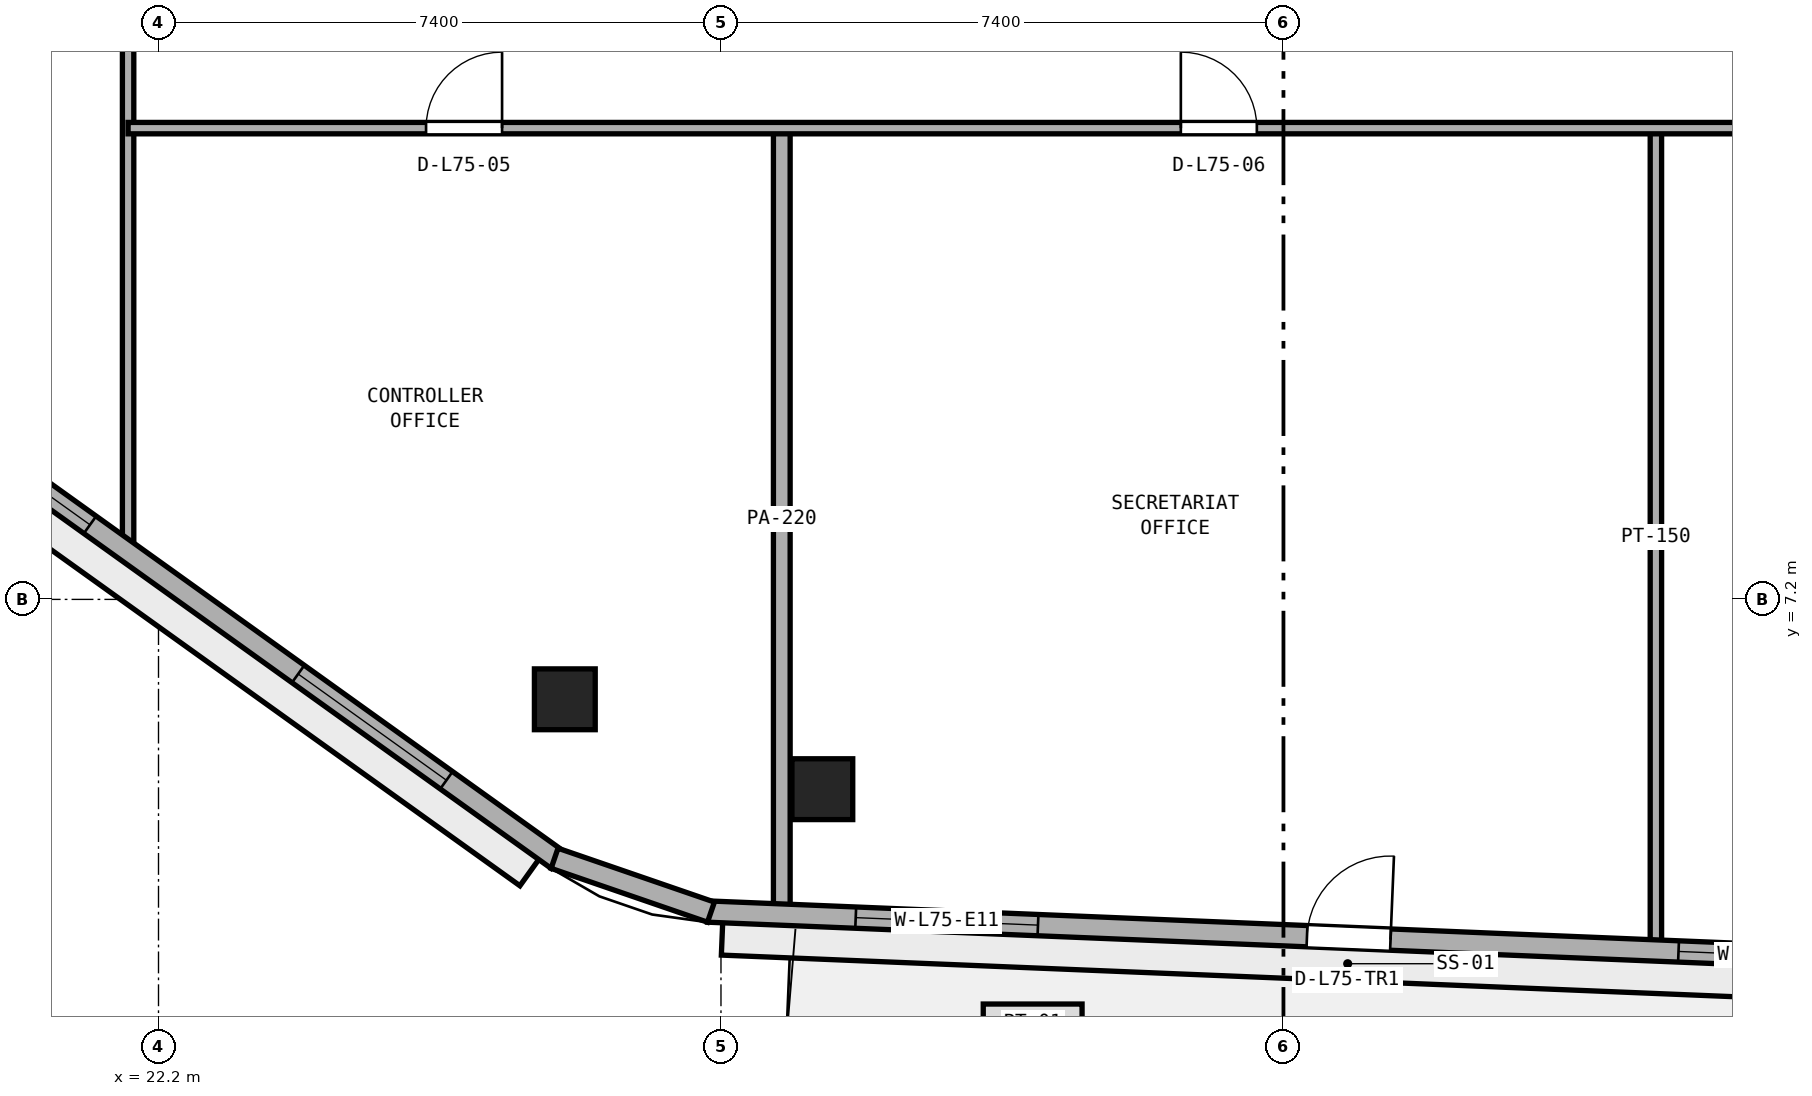
"""IFC4 building model, lengths in metres.
Left out: names, types, materials, properties, quantities, classifications, styles, units other than length and angle.
Written with IfcOpenShell. Run it as: python <this file> out.ifc"""

import sys

from ifc_helpers import new_model, si_unit, direction, frame, frame_2d, origin, origin_2d, place, context, subcontext, project, spatial, rectangle, extrude, element, fill, save


model = new_model("IFC4")
c1 = context("Model", 3, precision=1e-05, world=origin(), true_north=direction((0.0, 1.0)))
c2 = subcontext(c1, "Body", "Model", "MODEL_VIEW")
j1 = project(units=[si_unit("LENGTHUNIT", "METRE"), si_unit("PLANEANGLEUNIT", "RADIAN")], contexts=[c1])
p1 = place(None, origin())
s1 = spatial("IfcSite", under=j1, at=p1, CompositionType="ELEMENT")
p2 = place(p1, origin())
s2 = spatial("IfcBuilding", under=s1, at=p2, CompositionType="ELEMENT")
p3 = place(p2, frame((0.0, 0.0, 293.4)))
s3 = spatial("IfcBuildingStorey", under=s2, at=p3, CompositionType="ELEMENT", Elevation=293.4)
for number, where, z_axis, x_axis in (
    (1, (30.934, 4.703, 0.0), (0.0, 0.0, 1.0), (1.0, 0.0, 0.0)),
    (2, (27.545, 5.886, 0.0), (0.0, 0.0, 1.0), (1.0, 0.0, 0.0)),
):
    element("IfcColumn", number, at=place(p3, frame(where, z_axis=z_axis, x_axis=x_axis)), inside=s3, PredefinedType="COLUMN", context=c2, shape_type="SweptSolid", body=[
        extrude(rectangle(XDim=0.8, YDim=0.8, at=origin_2d()), origin(), (0.0, 0.0, 1.0), 3.8),
    ])
p4 = place(p3, frame((41.9, 2.646, 0.0), z_axis=(0.0, 0.0, 1.0), x_axis=(0.0, 1.0, 0.0)))
e3 = element("IfcWall", 3, at=p4, inside=s3, PredefinedType="PARTITIONING", context=c2, shape_type="SweptSolid", body=[
    extrude(rectangle(XDim=10.754, YDim=0.15, at=frame_2d((5.377, 0.0))), origin(), (0.0, 0.0, 1.0), 3.54),
])
p5 = place(p3, frame((30.4, 3.118, 0.0), z_axis=(0.0, 0.0, 1.0), x_axis=(0.0, 1.0, 0.0)))
e4 = element("IfcWall", 4, at=p5, inside=s3, PredefinedType="PARTITIONING", context=c2, shape_type="SweptSolid", body=[
    extrude(rectangle(XDim=10.282, YDim=0.22, at=frame_2d((5.141, 0.0))), origin(), (0.0, 0.0, 1.0), 3.54),
])
p6 = place(p3, frame((21.8, 7.79, 0.0), z_axis=(0.0, 0.0, 1.0), x_axis=(0.0, 1.0, 0.0)))
e5 = element("IfcWall", 5, at=p6, inside=s3, PredefinedType="PARTITIONING", context=c2, shape_type="SweptSolid", body=[
    extrude(rectangle(XDim=29.21, YDim=0.15, at=frame_2d((14.605, 0.0))), origin(), (0.0, 0.0, 1.0), 3.54),
])
p7 = place(p6, frame((9.76, 0.0, 0.0)))
e6 = element("IfcOpeningElement", 6, at=p7, cuts=e5, PredefinedType="OPENING", context=c2, shape_type="SweptSolid", body=[
    extrude(rectangle(XDim=0.9, YDim=2.1, at=frame_2d((0.45, 1.05))), frame((0.0, 0.085, 0.0), z_axis=(0.0, -1.0, 0.0), x_axis=(1.0, 0.0, 0.0)), (0.0, 0.0, 1.0), 0.17),
])
p8 = place(p6, frame((18.11, 0.0, 0.0)))
e7 = element("IfcOpeningElement", 7, at=p8, cuts=e5, PredefinedType="OPENING", context=c2, shape_type="SweptSolid", body=[
    extrude(rectangle(XDim=0.9, YDim=2.1, at=frame_2d((0.45, 1.05))), frame((0.0, 0.085, 0.0), z_axis=(0.0, -1.0, 0.0), x_axis=(1.0, 0.0, 0.0)), (0.0, 0.0, 1.0), 0.17),
])
p9 = place(p6, frame((23.485, 0.0, 0.0)))
e8 = element("IfcOpeningElement", 8, at=p9, cuts=e5, PredefinedType="OPENING", context=c2, shape_type="SweptSolid", body=[
    extrude(rectangle(XDim=0.9, YDim=2.1, at=frame_2d((0.45, 1.05))), frame((0.0, 0.085, 0.0), z_axis=(0.0, -1.0, 0.0), x_axis=(1.0, 0.0, 0.0)), (0.0, 0.0, 1.0), 0.17),
])
p10 = place(p3, frame((21.8, 13.4, 0.0), z_axis=(0.0, 0.0, 1.0), x_axis=(1.0, 0.0, 0.0)))
e9 = element("IfcWall", 9, at=p10, inside=s3, PredefinedType="PARTITIONING", context=c2, shape_type="SweptSolid", body=[
    extrude(rectangle(XDim=26.8, YDim=0.15, at=frame_2d((13.4, 0.0))), origin(), (0.0, 0.0, 1.0), 3.54),
])
p11 = place(p10, frame((3.92, 0.0, 0.0)))
e10 = element("IfcOpeningElement", 10, at=p11, cuts=e9, PredefinedType="OPENING", context=c2, shape_type="SweptSolid", body=[
    extrude(rectangle(XDim=1.0, YDim=2.12, at=frame_2d((0.5, 1.06))), frame((0.0, 0.085, 0.0), z_axis=(0.0, -1.0, 0.0), x_axis=(1.0, 0.0, 0.0)), (0.0, 0.0, 1.0), 0.17),
])
p12 = place(p10, frame((13.85, 0.0, 0.0)))
e11 = element("IfcOpeningElement", 11, at=p12, cuts=e9, PredefinedType="OPENING", context=c2, shape_type="SweptSolid", body=[
    extrude(rectangle(XDim=1.0, YDim=2.12, at=frame_2d((0.5, 1.06))), frame((0.0, 0.085, 0.0), z_axis=(0.0, -1.0, 0.0), x_axis=(1.0, 0.0, 0.0)), (0.0, 0.0, 1.0), 0.17),
])
p13 = place(p10, frame((22.88, 0.0, 0.0)))
e12 = element("IfcOpeningElement", 12, at=p13, cuts=e9, PredefinedType="OPENING", context=c2, shape_type="SweptSolid", body=[
    extrude(rectangle(XDim=0.9, YDim=2.1, at=frame_2d((0.45, 1.05))), frame((0.0, 0.085, 0.0), z_axis=(0.0, -1.0, 0.0), x_axis=(1.0, 0.0, 0.0)), (0.0, 0.0, 1.0), 0.17),
])
p14 = place(p3, frame((29.428, 3.093, 0.0), z_axis=(0.0, 0.0, 1.0), x_axis=(0.999156257967, -0.041070331944, 0.0)))
e13 = element("IfcWall", 13, at=p14, inside=s3, PredefinedType="STANDARD", context=c2, shape_type="SweptSolid", body=[
    extrude(rectangle(XDim=16.876, YDim=0.28, at=frame_2d((8.438, 0.0))), origin(), (0.0, 0.0, 1.0), 3.54),
])
p15 = place(p14, frame((7.888, 0.0, 0.0)))
e14 = element("IfcOpeningElement", 14, at=p15, cuts=e13, PredefinedType="OPENING", context=c2, shape_type="SweptSolid", body=[
    extrude(rectangle(XDim=1.1, YDim=2.2, at=frame_2d((0.55, 1.1))), frame((0.0, 0.15, 0.0), z_axis=(0.0, -1.0, 0.0), x_axis=(1.0, 0.0, 0.0)), (0.0, 0.0, 1.0), 0.3),
])
p16 = place(p14, frame((1.946, 0.0, 0.9)))
e15 = element("IfcOpeningElement", 15, at=p16, cuts=e13, PredefinedType="OPENING", context=c2, shape_type="SweptSolid", body=[
    extrude(rectangle(XDim=2.4, YDim=1.75, at=frame_2d((1.2, 0.875))), frame((0.0, 0.15, 0.0), z_axis=(0.0, -1.0, 0.0), x_axis=(1.0, 0.0, 0.0)), (0.0, 0.0, 1.0), 0.3),
])
p17 = place(p14, frame((12.78, 0.0, 0.9)))
e16 = element("IfcOpeningElement", 16, at=p17, cuts=e13, PredefinedType="OPENING", context=c2, shape_type="SweptSolid", body=[
    extrude(rectangle(XDim=2.4, YDim=1.75, at=frame_2d((1.2, 0.875))), frame((0.0, 0.15, 0.0), z_axis=(0.0, -1.0, 0.0), x_axis=(1.0, 0.0, 0.0)), (0.0, 0.0, 1.0), 0.3),
])
p18 = place(p3, frame((14.468, 13.077, 0.0), z_axis=(0.0, 0.0, 1.0), x_axis=(0.812809888039, -0.582529042972, 0.0)))
e17 = element("IfcWall", 17, at=p18, inside=s3, PredefinedType="STANDARD", context=c2, shape_type="SweptSolid", body=[
    extrude(rectangle(XDim=15.968, YDim=0.28, at=frame_2d((7.984, 0.0))), origin(), (0.0, 0.0, 1.0), 3.54),
])
p19 = place(p18, frame((1.795, 0.0, 0.9)))
e18 = element("IfcOpeningElement", 18, at=p19, cuts=e17, PredefinedType="OPENING", context=c2, shape_type="SweptSolid", body=[
    extrude(rectangle(XDim=2.4, YDim=1.75, at=frame_2d((1.2, 0.875))), frame((0.0, 0.15, 0.0), z_axis=(0.0, -1.0, 0.0), x_axis=(1.0, 0.0, 0.0)), (0.0, 0.0, 1.0), 0.3),
])
p20 = place(p18, frame((6.004, 0.0, 0.9)))
e19 = element("IfcOpeningElement", 19, at=p20, cuts=e17, PredefinedType="OPENING", context=c2, shape_type="SweptSolid", body=[
    extrude(rectangle(XDim=2.4, YDim=1.75, at=frame_2d((1.2, 0.875))), frame((0.0, 0.15, 0.0), z_axis=(0.0, -1.0, 0.0), x_axis=(1.0, 0.0, 0.0)), (0.0, 0.0, 1.0), 0.3),
])
p21 = place(p18, frame((11.773, 0.0, 0.9)))
e20 = element("IfcOpeningElement", 20, at=p21, cuts=e17, PredefinedType="OPENING", context=c2, shape_type="SweptSolid", body=[
    extrude(rectangle(XDim=2.4, YDim=1.75, at=frame_2d((1.2, 0.875))), frame((0.0, 0.15, 0.0), z_axis=(0.0, -1.0, 0.0), x_axis=(1.0, 0.0, 0.0)), (0.0, 0.0, 1.0), 0.3),
])
p22 = place(p3, frame((27.411, 3.794, 0.0), z_axis=(0.0, 0.0, 1.0), x_axis=(0.945552869008, -0.325468542121, 0.0)))
e21 = element("IfcWall", 21, at=p22, inside=s3, PredefinedType="STANDARD", context=c2, shape_type="SweptSolid", body=[
    extrude(rectangle(XDim=2.176, YDim=0.28, at=frame_2d((1.088, 0.0))), origin(), (0.0, 0.0, 1.0), 3.54),
])
p23 = place(p11, origin())
e22 = element("IfcDoor", 22, at=p23, inside=s3, OperationType="SINGLE_SWING_RIGHT", PredefinedType="DOOR", context=c2, shape_type="SweptSolid", body=[
    extrude(rectangle(XDim=1.0, YDim=2.12, at=frame_2d((0.5, 1.06))), frame((0.0, 0.025, 0.0), z_axis=(0.0, -1.0, 0.0), x_axis=(1.0, 0.0, 0.0)), (0.0, 0.0, 1.0), 0.05),
])
fill(e10, e22)
p24 = place(p12, origin())
e23 = element("IfcDoor", 23, at=p24, inside=s3, OperationType="SINGLE_SWING_LEFT", PredefinedType="DOOR", context=c2, shape_type="SweptSolid", body=[
    extrude(rectangle(XDim=1.0, YDim=2.12, at=frame_2d((0.5, 1.06))), frame((0.0, 0.025, 0.0), z_axis=(0.0, -1.0, 0.0), x_axis=(1.0, 0.0, 0.0)), (0.0, 0.0, 1.0), 0.05),
])
fill(e11, e23)
p25 = place(p15, origin())
e24 = element("IfcDoor", 24, at=p25, inside=s3, OperationType="SINGLE_SWING_RIGHT", PredefinedType="DOOR", context=c2, shape_type="SweptSolid", body=[
    extrude(rectangle(XDim=1.1, YDim=2.2, at=frame_2d((0.55, 1.1))), frame((0.0, 0.025, 0.0), z_axis=(0.0, -1.0, 0.0), x_axis=(1.0, 0.0, 0.0)), (0.0, 0.0, 1.0), 0.05),
])
fill(e14, e24)
p26 = place(p16, origin())
e25 = element("IfcWindow", 25, at=p26, inside=s3, PartitioningType="SINGLE_PANEL", PredefinedType="WINDOW", context=c2, shape_type="SweptSolid", body=[
    extrude(rectangle(XDim=2.4, YDim=1.75, at=frame_2d((1.2, 0.875))), frame((0.0, 0.03, 0.0), z_axis=(0.0, -1.0, 0.0), x_axis=(1.0, 0.0, 0.0)), (0.0, 0.0, 1.0), 0.06),
])
fill(e15, e25)
p27 = place(p17, origin())
e26 = element("IfcWindow", 26, at=p27, inside=s3, PartitioningType="SINGLE_PANEL", PredefinedType="WINDOW", context=c2, shape_type="SweptSolid", body=[
    extrude(rectangle(XDim=2.4, YDim=1.75, at=frame_2d((1.2, 0.875))), frame((0.0, 0.03, 0.0), z_axis=(0.0, -1.0, 0.0), x_axis=(1.0, 0.0, 0.0)), (0.0, 0.0, 1.0), 0.06),
])
fill(e16, e26)
p28 = place(p20, origin())
e27 = element("IfcWindow", 27, at=p28, inside=s3, PartitioningType="SINGLE_PANEL", PredefinedType="WINDOW", context=c2, shape_type="SweptSolid", body=[
    extrude(rectangle(XDim=2.4, YDim=1.75, at=frame_2d((1.2, 0.875))), frame((0.0, 0.03, 0.0), z_axis=(0.0, -1.0, 0.0), x_axis=(1.0, 0.0, 0.0)), (0.0, 0.0, 1.0), 0.06),
])
fill(e19, e27)
p29 = place(p21, origin())
e28 = element("IfcWindow", 28, at=p29, inside=s3, PartitioningType="SINGLE_PANEL", PredefinedType="WINDOW", context=c2, shape_type="SweptSolid", body=[
    extrude(rectangle(XDim=2.4, YDim=1.75, at=frame_2d((1.2, 0.875))), frame((0.0, 0.03, 0.0), z_axis=(0.0, -1.0, 0.0), x_axis=(1.0, 0.0, 0.0)), (0.0, 0.0, 1.0), 0.06),
])
fill(e20, e28)
save(model, sys.argv[1])
